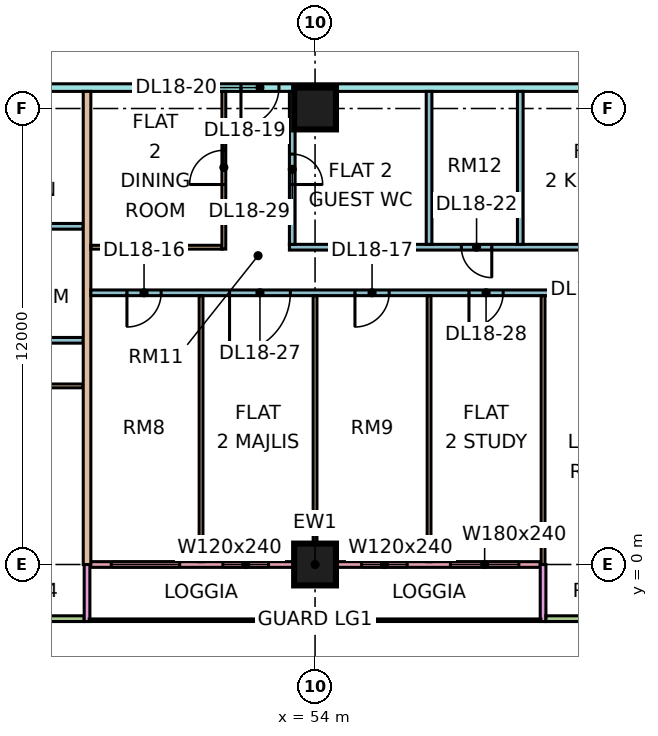
"""IFC4 building model, lengths in metres.
Left out: names, types, materials, properties, quantities, classifications, styles, units other than length and angle.
Written with IfcOpenShell. Run it as: python <this file> out.ifc"""

import sys

from ifc_helpers import new_model, si_unit, direction, frame, frame_2d, origin, origin_2d, place, context, subcontext, project, spatial, rectangle, extrude, element, fill, save


model = new_model("IFC4")
c1 = context("Model", 3, precision=1e-05, world=origin(), true_north=direction((0.0, 1.0)))
c2 = subcontext(c1, "Body", "Model", "MODEL_VIEW")
j1 = project(units=[si_unit("LENGTHUNIT", "METRE"), si_unit("PLANEANGLEUNIT", "RADIAN")], contexts=[c1])
p1 = place(None, origin())
s1 = spatial("IfcSite", under=j1, at=p1, CompositionType="ELEMENT")
p2 = place(p1, origin())
s2 = spatial("IfcBuilding", under=s1, at=p2, CompositionType="ELEMENT")
p3 = place(p2, frame((0.0, 0.0, 82.65)))
s3 = spatial("IfcBuildingStorey", under=s2, at=p3, CompositionType="ELEMENT", Elevation=82.65)
for number, where, z_axis, x_axis in (
    (1, (54.0, 0.0, 0.0), (0.0, 0.0, 1.0), (1.0, 0.0, 0.0)),
    (2, (54.0, 12.0, 0.0), (0.0, 0.0, 1.0), (1.0, 0.0, 0.0)),
):
    element("IfcColumn", number, at=place(p3, frame(where, z_axis=z_axis, x_axis=x_axis)), inside=s3, PredefinedType="COLUMN", context=c2, shape_type="SweptSolid", body=[
        extrude(rectangle(XDim=1.1, YDim=1.1, at=origin_2d()), origin(), (0.0, 0.0, 1.0), 3.75),
    ])
p4 = place(p3, frame((36.075, -1.425, 0.0), z_axis=(0.0, 0.0, 1.0), x_axis=(1.0, 0.0, 0.0)))
e3 = element("IfcWall", 3, at=p4, inside=s3, PredefinedType="SOLIDWALL", context=c2, shape_type="SweptSolid", body=[
    extrude(rectangle(XDim=11.85, YDim=0.15, at=frame_2d((5.925, 0.0))), origin(), (0.0, 0.0, 1.0), 3.3),
])
p5 = place(p4, frame((0.562, 0.0, 0.45)))
e4 = element("IfcOpeningElement", 4, at=p5, cuts=e3, PredefinedType="OPENING", context=c2, shape_type="SweptSolid", body=[
    extrude(rectangle(XDim=1.8, YDim=2.4, at=frame_2d((0.9, 1.2))), frame((0.0, 0.085, 0.0), z_axis=(0.0, -1.0, 0.0), x_axis=(1.0, 0.0, 0.0)), (0.0, 0.0, 1.0), 0.17),
])
p6 = place(p4, frame((5.887, 0.0, 0.45)))
e5 = element("IfcOpeningElement", 5, at=p6, cuts=e3, PredefinedType="OPENING", context=c2, shape_type="SweptSolid", body=[
    extrude(rectangle(XDim=3.0, YDim=2.4, at=frame_2d((1.5, 1.2))), frame((0.0, 0.085, 0.0), z_axis=(0.0, -1.0, 0.0), x_axis=(1.0, 0.0, 0.0)), (0.0, 0.0, 1.0), 0.17),
])
p7 = place(p3, frame((48.075, 0.0, 0.0), z_axis=(0.0, 0.0, 1.0), x_axis=(1.0, 0.0, 0.0)))
e6 = element("IfcWall", 6, at=p7, inside=s3, PredefinedType="SOLIDWALL", context=c2, shape_type="SweptSolid", body=[
    extrude(rectangle(XDim=11.85, YDim=0.15, at=frame_2d((5.925, 0.0))), origin(), (0.0, 0.0, 1.0), 3.3),
])
p8 = place(p7, frame((0.562, 0.0, 0.45)))
e7 = element("IfcOpeningElement", 7, at=p8, cuts=e6, PredefinedType="OPENING", context=c2, shape_type="SweptSolid", body=[
    extrude(rectangle(XDim=1.8, YDim=2.4, at=frame_2d((0.9, 1.2))), frame((0.0, 0.085, 0.0), z_axis=(0.0, -1.0, 0.0), x_axis=(1.0, 0.0, 0.0)), (0.0, 0.0, 1.0), 0.17),
])
p9 = place(p7, frame((3.5, 0.0, 0.45)))
e8 = element("IfcOpeningElement", 8, at=p9, cuts=e6, PredefinedType="OPENING", context=c2, shape_type="SweptSolid", body=[
    extrude(rectangle(XDim=1.2, YDim=2.4, at=frame_2d((0.6, 1.2))), frame((0.0, 0.085, 0.0), z_axis=(0.0, -1.0, 0.0), x_axis=(1.0, 0.0, 0.0)), (0.0, 0.0, 1.0), 0.17),
])
p10 = place(p7, frame((7.15, 0.0, 0.45)))
e9 = element("IfcOpeningElement", 9, at=p10, cuts=e6, PredefinedType="OPENING", context=c2, shape_type="SweptSolid", body=[
    extrude(rectangle(XDim=1.2, YDim=2.4, at=frame_2d((0.6, 1.2))), frame((0.0, 0.085, 0.0), z_axis=(0.0, -1.0, 0.0), x_axis=(1.0, 0.0, 0.0)), (0.0, 0.0, 1.0), 0.17),
])
p11 = place(p7, frame((9.488, 0.0, 0.45)))
e10 = element("IfcOpeningElement", 10, at=p11, cuts=e6, PredefinedType="OPENING", context=c2, shape_type="SweptSolid", body=[
    extrude(rectangle(XDim=1.8, YDim=2.4, at=frame_2d((0.9, 1.2))), frame((0.0, 0.085, 0.0), z_axis=(0.0, -1.0, 0.0), x_axis=(1.0, 0.0, 0.0)), (0.0, 0.0, 1.0), 0.17),
])
for number, where, z_axis, x_axis in (
    (11, (48.0, -1.5, 0.0), (0.0, 0.0, 1.0), (0.0, 1.0, 0.0)),
    (12, (60.0, -1.5, 0.0), (0.0, 0.0, 1.0), (0.0, 1.0, 0.0)),
):
    element("IfcWall", number, at=place(p3, frame(where, z_axis=z_axis, x_axis=x_axis)), inside=s3, PredefinedType="SOLIDWALL", context=c2, shape_type="SweptSolid", body=[
        extrude(rectangle(XDim=1.5, YDim=0.15, at=frame_2d((0.75, 0.0))), origin(), (0.0, 0.0, 1.0), 3.3),
    ])
p12 = place(p3, frame((60.075, -1.425, 0.0), z_axis=(0.0, 0.0, 1.0), x_axis=(1.0, 0.0, 0.0)))
e13 = element("IfcWall", 13, at=p12, inside=s3, PredefinedType="SOLIDWALL", context=c2, shape_type="SweptSolid", body=[
    extrude(rectangle(XDim=10.425, YDim=0.15, at=frame_2d((5.212, 0.0))), origin(), (0.0, 0.0, 1.0), 3.3),
])
p13 = place(p12, frame((1.462, 0.0, 0.45)))
e14 = element("IfcOpeningElement", 14, at=p13, cuts=e13, PredefinedType="OPENING", context=c2, shape_type="SweptSolid", body=[
    extrude(rectangle(XDim=3.0, YDim=2.4, at=frame_2d((1.5, 1.2))), frame((0.0, 0.085, 0.0), z_axis=(0.0, -1.0, 0.0), x_axis=(1.0, 0.0, 0.0)), (0.0, 0.0, 1.0), 0.17),
])
p14 = place(p12, frame((6.525, 0.0, 0.45)))
e15 = element("IfcOpeningElement", 15, at=p14, cuts=e13, PredefinedType="OPENING", context=c2, shape_type="SweptSolid", body=[
    extrude(rectangle(XDim=1.8, YDim=2.4, at=frame_2d((0.9, 1.2))), frame((0.0, 0.085, 0.0), z_axis=(0.0, -1.0, 0.0), x_axis=(1.0, 0.0, 0.0)), (0.0, 0.0, 1.0), 0.17),
])
p15 = place(p12, frame((9.225, 0.0, 0.45)))
e16 = element("IfcOpeningElement", 16, at=p15, cuts=e13, PredefinedType="OPENING", context=c2, shape_type="SweptSolid", body=[
    extrude(rectangle(XDim=0.9, YDim=2.4, at=frame_2d((0.45, 1.2))), frame((0.0, 0.085, 0.0), z_axis=(0.0, -1.0, 0.0), x_axis=(1.0, 0.0, 0.0)), (0.0, 0.0, 1.0), 0.17),
])
p16 = place(p3, frame((33.05, 4.7, 0.0), z_axis=(0.0, 0.0, 1.0), x_axis=(1.0, 0.0, 0.0)))
e17 = element("IfcWall", 17, at=p16, inside=s3, PredefinedType="PARTITIONING", context=c2, shape_type="SweptSolid", body=[
    extrude(rectangle(XDim=14.85, YDim=0.1, at=frame_2d((7.425, 0.0))), origin(), (0.0, 0.0, 1.0), 3.3),
])
p17 = place(p16, frame((1.0, 0.0, 0.0)))
e18 = element("IfcOpeningElement", 18, at=p17, cuts=e17, PredefinedType="OPENING", context=c2, shape_type="SweptSolid", body=[
    extrude(rectangle(XDim=0.9, YDim=2.1, at=frame_2d((0.45, 1.05))), frame((0.0, 0.06, 0.0), z_axis=(0.0, -1.0, 0.0), x_axis=(1.0, 0.0, 0.0)), (0.0, 0.0, 1.0), 0.12),
])
p18 = place(p16, frame((4.0, 0.0, 0.0)))
e19 = element("IfcOpeningElement", 19, at=p18, cuts=e17, PredefinedType="OPENING", context=c2, shape_type="SweptSolid", body=[
    extrude(rectangle(XDim=0.9, YDim=2.1, at=frame_2d((0.45, 1.05))), frame((0.0, 0.06, 0.0), z_axis=(0.0, -1.0, 0.0), x_axis=(1.0, 0.0, 0.0)), (0.0, 0.0, 1.0), 0.12),
])
p19 = place(p16, frame((10.0, 0.0, 0.0)))
e20 = element("IfcOpeningElement", 20, at=p19, cuts=e17, PredefinedType="OPENING", context=c2, shape_type="SweptSolid", body=[
    extrude(rectangle(XDim=0.9, YDim=2.1, at=frame_2d((0.45, 1.05))), frame((0.0, 0.06, 0.0), z_axis=(0.0, -1.0, 0.0), x_axis=(1.0, 0.0, 0.0)), (0.0, 0.0, 1.0), 0.12),
])
p20 = place(p3, frame((40.65, 12.55, 0.0), z_axis=(0.0, 0.0, 1.0), x_axis=(1.0, 0.0, 0.0)))
e21 = element("IfcWall", 21, at=p20, inside=s3, PredefinedType="PARTITIONING", context=c2, shape_type="SweptSolid", body=[
    extrude(rectangle(XDim=28.125, YDim=0.2, at=frame_2d((14.062, 0.0))), origin(), (0.0, 0.0, 1.0), 3.3),
])
p21 = place(p20, frame((11.4, 0.0, 0.0)))
e22 = element("IfcOpeningElement", 22, at=p21, cuts=e21, PredefinedType="OPENING", context=c2, shape_type="SweptSolid", body=[
    extrude(rectangle(XDim=1.0, YDim=2.1, at=frame_2d((0.5, 1.05))), frame((0.0, 0.11, 0.0), z_axis=(0.0, -1.0, 0.0), x_axis=(1.0, 0.0, 0.0)), (0.0, 0.0, 1.0), 0.22),
])
p22 = place(p20, frame((1.05, 0.0, 0.0)))
e23 = element("IfcOpeningElement", 23, at=p22, cuts=e21, PredefinedType="OPENING", context=c2, shape_type="SweptSolid", body=[
    extrude(rectangle(XDim=1.0, YDim=2.1, at=frame_2d((0.5, 1.05))), frame((0.0, 0.11, 0.0), z_axis=(0.0, -1.0, 0.0), x_axis=(1.0, 0.0, 0.0)), (0.0, 0.0, 1.0), 0.22),
])
p23 = place(p3, frame((43.725, 5.9, 0.0), z_axis=(0.0, 0.0, 1.0), x_axis=(1.0, 0.0, 0.0)))
e24 = element("IfcWall", 24, at=p23, inside=s3, PredefinedType="PARTITIONING", context=c2, shape_type="SweptSolid", body=[
    extrude(rectangle(XDim=4.175, YDim=0.15, at=frame_2d((2.087, 0.0))), origin(), (0.0, 0.0, 1.0), 3.3),
])
p24 = place(p23, frame((1.675, 0.0, 0.0)))
e25 = element("IfcOpeningElement", 25, at=p24, cuts=e24, PredefinedType="OPENING", context=c2, shape_type="SweptSolid", body=[
    extrude(rectangle(XDim=0.8, YDim=2.1, at=frame_2d((0.4, 1.05))), frame((0.0, 0.085, 0.0), z_axis=(0.0, -1.0, 0.0), x_axis=(1.0, 0.0, 0.0)), (0.0, 0.0, 1.0), 0.17),
])
p25 = place(p3, frame((43.725, 8.9, 0.0), z_axis=(0.0, 0.0, 1.0), x_axis=(1.0, 0.0, 0.0)))
e26 = element("IfcWall", 26, at=p25, inside=s3, PredefinedType="PARTITIONING", context=c2, shape_type="SweptSolid", body=[
    extrude(rectangle(XDim=4.175, YDim=0.15, at=frame_2d((2.087, 0.0))), origin(), (0.0, 0.0, 1.0), 3.3),
])
p26 = place(p3, frame((48.0, 0.0, 0.0), z_axis=(0.0, 0.0, 1.0), x_axis=(0.0, 1.0, 0.0)))
e27 = element("IfcWall", 27, at=p26, inside=s3, PredefinedType="PARTITIONING", context=c2, shape_type="SweptSolid", body=[
    extrude(rectangle(XDim=12.45, YDim=0.2, at=frame_2d((6.225, 0.0))), origin(), (0.0, 0.0, 1.0), 3.3),
])
p27 = place(p3, frame((48.1, 7.15, 0.0), z_axis=(0.0, 0.0, 1.0), x_axis=(1.0, 0.0, 0.0)))
e28 = element("IfcWall", 28, at=p27, inside=s3, PredefinedType="PARTITIONING", context=c2, shape_type="SweptSolid", body=[
    extrude(rectangle(XDim=23.826, YDim=0.15, at=frame_2d((11.913, 0.0))), origin(), (0.0, 0.0, 1.0), 3.3),
])
p28 = place(p27, frame((0.95, 0.0, 0.0)))
e29 = element("IfcOpeningElement", 29, at=p28, cuts=e28, PredefinedType="OPENING", context=c2, shape_type="SweptSolid", body=[
    extrude(rectangle(XDim=0.9, YDim=2.1, at=frame_2d((0.45, 1.05))), frame((0.0, 0.085, 0.0), z_axis=(0.0, -1.0, 0.0), x_axis=(1.0, 0.0, 0.0)), (0.0, 0.0, 1.0), 0.17),
])
p29 = place(p27, frame((6.95, 0.0, 0.0)))
e30 = element("IfcOpeningElement", 30, at=p29, cuts=e28, PredefinedType="OPENING", context=c2, shape_type="SweptSolid", body=[
    extrude(rectangle(XDim=0.9, YDim=2.1, at=frame_2d((0.45, 1.05))), frame((0.0, 0.085, 0.0), z_axis=(0.0, -1.0, 0.0), x_axis=(1.0, 0.0, 0.0)), (0.0, 0.0, 1.0), 0.17),
])
p30 = place(p27, frame((21.95, 0.0, 0.0)))
e31 = element("IfcOpeningElement", 31, at=p30, cuts=e28, PredefinedType="OPENING", context=c2, shape_type="SweptSolid", body=[
    extrude(rectangle(XDim=0.9, YDim=2.1, at=frame_2d((0.45, 1.05))), frame((0.0, 0.085, 0.0), z_axis=(0.0, -1.0, 0.0), x_axis=(1.0, 0.0, 0.0)), (0.0, 0.0, 1.0), 0.17),
])
p31 = place(p27, frame((14.45, 0.0, 0.0)))
e32 = element("IfcOpeningElement", 32, at=p31, cuts=e28, PredefinedType="OPENING", context=c2, shape_type="SweptSolid", body=[
    extrude(rectangle(XDim=0.9, YDim=2.1, at=frame_2d((0.45, 1.05))), frame((0.0, 0.085, 0.0), z_axis=(0.0, -1.0, 0.0), x_axis=(1.0, 0.0, 0.0)), (0.0, 0.0, 1.0), 0.17),
])
p32 = place(p27, frame((19.8, 0.0, 0.0)))
e33 = element("IfcOpeningElement", 33, at=p32, cuts=e28, PredefinedType="OPENING", context=c2, shape_type="SweptSolid", body=[
    extrude(rectangle(XDim=0.8, YDim=2.1, at=frame_2d((0.4, 1.05))), frame((0.0, 0.085, 0.0), z_axis=(0.0, -1.0, 0.0), x_axis=(1.0, 0.0, 0.0)), (0.0, 0.0, 1.0), 0.17),
])
p33 = place(p27, frame((3.65, 0.0, 0.0)))
e34 = element("IfcOpeningElement", 34, at=p33, cuts=e28, PredefinedType="OPENING", context=c2, shape_type="SweptSolid", body=[
    extrude(rectangle(XDim=1.6, YDim=2.1, at=frame_2d((0.8, 1.05))), frame((0.0, 0.085, 0.0), z_axis=(0.0, -1.0, 0.0), x_axis=(1.0, 0.0, 0.0)), (0.0, 0.0, 1.0), 0.17),
])
p34 = place(p27, frame((9.95, 0.0, 0.0)))
e35 = element("IfcOpeningElement", 35, at=p34, cuts=e28, PredefinedType="OPENING", context=c2, shape_type="SweptSolid", body=[
    extrude(rectangle(XDim=0.9, YDim=2.1, at=frame_2d((0.45, 1.05))), frame((0.0, 0.085, 0.0), z_axis=(0.0, -1.0, 0.0), x_axis=(1.0, 0.0, 0.0)), (0.0, 0.0, 1.0), 0.17),
])
p35 = place(p3, frame((48.1, 8.35, 0.0), z_axis=(0.0, 0.0, 1.0), x_axis=(1.0, 0.0, 0.0)))
e36 = element("IfcWall", 36, at=p35, inside=s3, PredefinedType="PARTITIONING", context=c2, shape_type="SweptSolid", body=[
    extrude(rectangle(XDim=3.45, YDim=0.1, at=frame_2d((1.725, 0.0))), origin(), (0.0, 0.0, 1.0), 3.3),
])
p36 = place(p3, frame((51.0, 0.074, 0.0), z_axis=(0.0, 0.0, 1.0), x_axis=(0.0, 1.0, 0.0)))
e37 = element("IfcWall", 37, at=p36, inside=s3, PredefinedType="PARTITIONING", context=c2, shape_type="SweptSolid", body=[
    extrude(rectangle(XDim=7.001, YDim=0.1, at=frame_2d((3.5, 0.0))), origin(), (0.0, 0.0, 1.0), 3.3),
])
p37 = place(p3, frame((51.6, 8.3, 0.0), z_axis=(0.0, 0.0, 1.0), x_axis=(0.0, 1.0, 0.0)))
e38 = element("IfcWall", 38, at=p37, inside=s3, PredefinedType="PARTITIONING", context=c2, shape_type="SweptSolid", body=[
    extrude(rectangle(XDim=4.15, YDim=0.1, at=frame_2d((2.075, 0.0))), origin(), (0.0, 0.0, 1.0), 3.3),
])
p38 = place(p37, frame((1.7, 0.0, 0.0)))
e39 = element("IfcOpeningElement", 39, at=p38, cuts=e38, PredefinedType="OPENING", context=c2, shape_type="SweptSolid", body=[
    extrude(rectangle(XDim=0.9, YDim=2.1, at=frame_2d((0.45, 1.05))), frame((0.0, 0.06, 0.0), z_axis=(0.0, -1.0, 0.0), x_axis=(1.0, 0.0, 0.0)), (0.0, 0.0, 1.0), 0.12),
])
p39 = place(p3, frame((53.325, 8.35, 0.0), z_axis=(0.0, 0.0, 1.0), x_axis=(1.0, 0.0, 0.0)))
e40 = element("IfcWall", 40, at=p39, inside=s3, PredefinedType="PARTITIONING", context=c2, shape_type="SweptSolid", body=[
    extrude(rectangle(XDim=15.45, YDim=0.15, at=frame_2d((7.725, 0.0))), origin(), (0.0, 0.0, 1.0), 3.3),
])
p40 = place(p39, frame((13.275, 0.0, 0.0)))
e41 = element("IfcOpeningElement", 41, at=p40, cuts=e40, PredefinedType="OPENING", context=c2, shape_type="SweptSolid", body=[
    extrude(rectangle(XDim=0.8, YDim=2.1, at=frame_2d((0.4, 1.05))), frame((0.0, 0.085, 0.0), z_axis=(0.0, -1.0, 0.0), x_axis=(1.0, 0.0, 0.0)), (0.0, 0.0, 1.0), 0.17),
])
p41 = place(p39, frame((8.625, 0.0, 0.0)))
e42 = element("IfcOpeningElement", 42, at=p41, cuts=e40, PredefinedType="OPENING", context=c2, shape_type="SweptSolid", body=[
    extrude(rectangle(XDim=0.9, YDim=2.1, at=frame_2d((0.45, 1.05))), frame((0.0, 0.085, 0.0), z_axis=(0.0, -1.0, 0.0), x_axis=(1.0, 0.0, 0.0)), (0.0, 0.0, 1.0), 0.17),
])
p42 = place(p39, frame((4.525, 0.0, 0.0)))
e43 = element("IfcOpeningElement", 43, at=p42, cuts=e40, PredefinedType="OPENING", context=c2, shape_type="SweptSolid", body=[
    extrude(rectangle(XDim=0.8, YDim=2.1, at=frame_2d((0.4, 1.05))), frame((0.0, 0.085, 0.0), z_axis=(0.0, -1.0, 0.0), x_axis=(1.0, 0.0, 0.0)), (0.0, 0.0, 1.0), 0.17),
])
p43 = place(p3, frame((53.4, 8.425, 0.0), z_axis=(0.0, 0.0, 1.0), x_axis=(0.0, 1.0, 0.0)))
e44 = element("IfcWall", 44, at=p43, inside=s3, PredefinedType="PARTITIONING", context=c2, shape_type="SweptSolid", body=[
    extrude(rectangle(XDim=4.025, YDim=0.15, at=frame_2d((2.012, 0.0))), origin(), (0.0, 0.0, 1.0), 3.3),
])
p44 = place(p43, frame((1.575, 0.0, 0.0)))
e45 = element("IfcOpeningElement", 45, at=p44, cuts=e44, PredefinedType="OPENING", context=c2, shape_type="SweptSolid", body=[
    extrude(rectangle(XDim=0.8, YDim=2.1, at=frame_2d((0.4, 1.05))), frame((0.0, 0.085, 0.0), z_axis=(0.0, -1.0, 0.0), x_axis=(1.0, 0.0, 0.0)), (0.0, 0.0, 1.0), 0.17),
])
for number, where, z_axis, x_axis in (
    (46, (54.0, 0.074, 0.0), (0.0, 0.0, 1.0), (0.0, 1.0, 0.0)),
    (47, (57.0, 0.074, 0.0), (0.0, 0.0, 1.0), (0.0, 1.0, 0.0)),
):
    element("IfcWall", number, at=place(p3, frame(where, z_axis=z_axis, x_axis=x_axis)), inside=s3, PredefinedType="PARTITIONING", context=c2, shape_type="SweptSolid", body=[
        extrude(rectangle(XDim=7.001, YDim=0.1, at=frame_2d((3.5, 0.0))), origin(), (0.0, 0.0, 1.0), 3.3),
    ])
for number, where, z_axis, x_axis in (
    (48, (57.0, 8.425, 0.0), (0.0, 0.0, 1.0), (0.0, 1.0, 0.0)),
    (49, (59.4, 8.425, 0.0), (0.0, 0.0, 1.0), (0.0, 1.0, 0.0)),
):
    element("IfcWall", number, at=place(p3, frame(where, z_axis=z_axis, x_axis=x_axis)), inside=s3, PredefinedType="PARTITIONING", context=c2, shape_type="SweptSolid", body=[
        extrude(rectangle(XDim=4.025, YDim=0.15, at=frame_2d((2.012, 0.0))), origin(), (0.0, 0.0, 1.0), 3.3),
    ])
p45 = place(p3, frame((60.0, 0.0, 0.0), z_axis=(0.0, 0.0, 1.0), x_axis=(0.0, 1.0, 0.0)))
e50 = element("IfcWall", 50, at=p45, inside=s3, PredefinedType="PARTITIONING", context=c2, shape_type="SweptSolid", body=[
    extrude(rectangle(XDim=7.075, YDim=0.1, at=frame_2d((3.538, 0.0))), origin(), (0.0, 0.0, 1.0), 3.3),
])
p46 = place(p8, origin())
e51 = element("IfcWindow", 51, at=p46, inside=s3, PartitioningType="SINGLE_PANEL", PredefinedType="WINDOW", context=c2, shape_type="SweptSolid", body=[
    extrude(rectangle(XDim=1.8, YDim=2.4, at=frame_2d((0.9, 1.2))), frame((0.0, 0.03, 0.0), z_axis=(0.0, -1.0, 0.0), x_axis=(1.0, 0.0, 0.0)), (0.0, 0.0, 1.0), 0.06),
])
fill(e7, e51)
p47 = place(p9, origin())
e52 = element("IfcWindow", 52, at=p47, inside=s3, PartitioningType="SINGLE_PANEL", PredefinedType="WINDOW", context=c2, shape_type="SweptSolid", body=[
    extrude(rectangle(XDim=1.2, YDim=2.4, at=frame_2d((0.6, 1.2))), frame((0.0, 0.03, 0.0), z_axis=(0.0, -1.0, 0.0), x_axis=(1.0, 0.0, 0.0)), (0.0, 0.0, 1.0), 0.06),
])
fill(e8, e52)
p48 = place(p10, origin())
e53 = element("IfcWindow", 53, at=p48, inside=s3, PartitioningType="SINGLE_PANEL", PredefinedType="WINDOW", context=c2, shape_type="SweptSolid", body=[
    extrude(rectangle(XDim=1.2, YDim=2.4, at=frame_2d((0.6, 1.2))), frame((0.0, 0.03, 0.0), z_axis=(0.0, -1.0, 0.0), x_axis=(1.0, 0.0, 0.0)), (0.0, 0.0, 1.0), 0.06),
])
fill(e9, e53)
p49 = place(p11, origin())
e54 = element("IfcWindow", 54, at=p49, inside=s3, PartitioningType="SINGLE_PANEL", PredefinedType="WINDOW", context=c2, shape_type="SweptSolid", body=[
    extrude(rectangle(XDim=1.8, YDim=2.4, at=frame_2d((0.9, 1.2))), frame((0.0, 0.03, 0.0), z_axis=(0.0, -1.0, 0.0), x_axis=(1.0, 0.0, 0.0)), (0.0, 0.0, 1.0), 0.06),
])
fill(e10, e54)
p50 = place(p28, frame((0.9, 0.0, 0.0), z_axis=(0.0, 0.0, 1.0), x_axis=(-1.0, 0.0, 0.0)))
e55 = element("IfcDoor", 55, at=p50, inside=s3, OperationType="SINGLE_SWING_LEFT", PredefinedType="DOOR", context=c2, shape_type="SweptSolid", body=[
    extrude(rectangle(XDim=0.9, YDim=2.1, at=frame_2d((0.45, 1.05))), frame((0.0, 0.025, 0.0), z_axis=(0.0, -1.0, 0.0), x_axis=(1.0, 0.0, 0.0)), (0.0, 0.0, 1.0), 0.05),
])
fill(e29, e55)
p51 = place(p29, frame((0.9, 0.0, 0.0), z_axis=(0.0, 0.0, 1.0), x_axis=(-1.0, 0.0, 0.0)))
e56 = element("IfcDoor", 56, at=p51, inside=s3, OperationType="SINGLE_SWING_LEFT", PredefinedType="DOOR", context=c2, shape_type="SweptSolid", body=[
    extrude(rectangle(XDim=0.9, YDim=2.1, at=frame_2d((0.45, 1.05))), frame((0.0, 0.025, 0.0), z_axis=(0.0, -1.0, 0.0), x_axis=(1.0, 0.0, 0.0)), (0.0, 0.0, 1.0), 0.05),
])
fill(e30, e56)
p52 = place(p38, origin())
e57 = element("IfcDoor", 57, at=p52, inside=s3, OperationType="SINGLE_SWING_LEFT", PredefinedType="DOOR", context=c2, shape_type="SweptSolid", body=[
    extrude(rectangle(XDim=0.9, YDim=2.1, at=frame_2d((0.45, 1.05))), frame((0.0, 0.025, 0.0), z_axis=(0.0, -1.0, 0.0), x_axis=(1.0, 0.0, 0.0)), (0.0, 0.0, 1.0), 0.05),
])
fill(e39, e57)
p53 = place(p21, frame((1.0, 0.0, 0.0), z_axis=(0.0, 0.0, 1.0), x_axis=(-1.0, 0.0, 0.0)))
e58 = element("IfcDoor", 58, at=p53, inside=s3, OperationType="SINGLE_SWING_LEFT", PredefinedType="DOOR", context=c2, shape_type="SweptSolid", body=[
    extrude(rectangle(XDim=1.0, YDim=2.1, at=frame_2d((0.5, 1.05))), frame((0.0, 0.025, 0.0), z_axis=(0.0, -1.0, 0.0), x_axis=(1.0, 0.0, 0.0)), (0.0, 0.0, 1.0), 0.05),
])
fill(e22, e58)
p54 = place(p42, origin())
e59 = element("IfcDoor", 59, at=p54, inside=s3, OperationType="SINGLE_SWING_RIGHT", PredefinedType="DOOR", context=c2, shape_type="SweptSolid", body=[
    extrude(rectangle(XDim=0.8, YDim=2.1, at=frame_2d((0.4, 1.05))), frame((0.0, 0.025, 0.0), z_axis=(0.0, -1.0, 0.0), x_axis=(1.0, 0.0, 0.0)), (0.0, 0.0, 1.0), 0.05),
])
fill(e43, e59)
p55 = place(p33, frame((1.6, 0.0, 0.0), z_axis=(0.0, 0.0, 1.0), x_axis=(-1.0, 0.0, 0.0)))
e60 = element("IfcDoor", 60, at=p55, inside=s3, OperationType="DOUBLE_DOOR_SINGLE_SWING", PredefinedType="DOOR", context=c2, shape_type="SweptSolid", body=[
    extrude(rectangle(XDim=1.6, YDim=2.1, at=frame_2d((0.8, 1.05))), frame((0.0, 0.025, 0.0), z_axis=(0.0, -1.0, 0.0), x_axis=(1.0, 0.0, 0.0)), (0.0, 0.0, 1.0), 0.05),
])
fill(e34, e60)
p56 = place(p34, frame((0.9, 0.0, 0.0), z_axis=(0.0, 0.0, 1.0), x_axis=(-1.0, 0.0, 0.0)))
e61 = element("IfcDoor", 61, at=p56, inside=s3, OperationType="SINGLE_SWING_LEFT", PredefinedType="DOOR", context=c2, shape_type="SweptSolid", body=[
    extrude(rectangle(XDim=0.9, YDim=2.1, at=frame_2d((0.45, 1.05))), frame((0.0, 0.025, 0.0), z_axis=(0.0, -1.0, 0.0), x_axis=(1.0, 0.0, 0.0)), (0.0, 0.0, 1.0), 0.05),
])
fill(e35, e61)
p57 = place(p44, frame((0.8, 0.0, 0.0), z_axis=(0.0, 0.0, 1.0), x_axis=(-1.0, 0.0, 0.0)))
e62 = element("IfcDoor", 62, at=p57, inside=s3, OperationType="SINGLE_SWING_LEFT", PredefinedType="DOOR", context=c2, shape_type="SweptSolid", body=[
    extrude(rectangle(XDim=0.8, YDim=2.1, at=frame_2d((0.4, 1.05))), frame((0.0, 0.025, 0.0), z_axis=(0.0, -1.0, 0.0), x_axis=(1.0, 0.0, 0.0)), (0.0, 0.0, 1.0), 0.05),
])
fill(e45, e62)
save(model, sys.argv[1])
